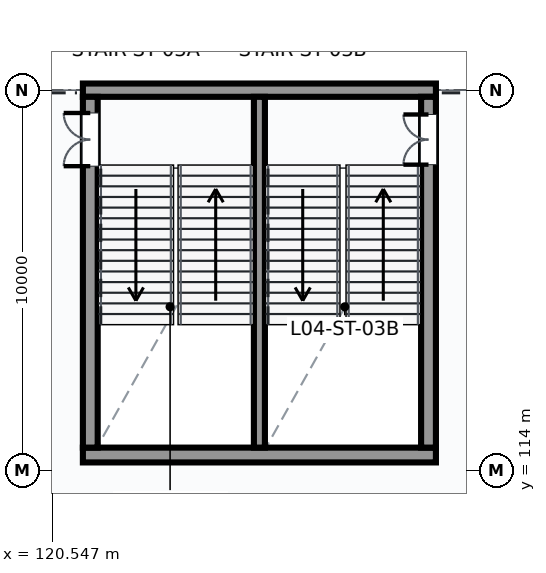
"""IFC4 building model, lengths in metres.
Left out: names, types, materials, properties, quantities, classifications, styles, units other than length and angle.
Written with IfcOpenShell. Run it as: python <this file> out.ifc"""

import sys

from ifc_helpers import new_model, si_unit, direction, frame, frame_2d, origin, place, context, subcontext, project, spatial, rectangle, extrude, element, fill, save


model = new_model("IFC4")
c1 = context("Model", 3, precision=1e-05, world=origin(), true_north=direction((0.0, 1.0)))
c2 = subcontext(c1, "Body", "Model", "MODEL_VIEW")
j1 = project(units=[si_unit("LENGTHUNIT", "METRE"), si_unit("PLANEANGLEUNIT", "RADIAN")], contexts=[c1])
p1 = place(None, origin())
s1 = spatial("IfcSite", under=j1, at=p1, CompositionType="ELEMENT")
p2 = place(p1, origin())
s2 = spatial("IfcBuilding", under=s1, at=p2, CompositionType="ELEMENT")
p3 = place(p2, frame((0.0, 0.0, 19.2)))
s3 = spatial("IfcBuildingStorey", under=s2, at=p3, CompositionType="ELEMENT", Elevation=19.2)
p4 = place(p3, frame((121.355, 114.4, 0.0), z_axis=(0.0, 0.0, 1.0), x_axis=(1.0, 0.0, 0.0)))
e1 = element("IfcWall", 1, at=p4, inside=s3, PredefinedType="SHEAR", context=c2, shape_type="SweptSolid", body=[
    extrude(rectangle(XDim=9.29, YDim=0.39, at=frame_2d((4.645, 0.0))), origin(), (0.0, 0.0, 1.0), 5.4),
])
p5 = place(p3, frame((121.355, 124.0, 0.0), z_axis=(0.0, 0.0, 1.0), x_axis=(1.0, 0.0, 0.0)))
e2 = element("IfcWall", 2, at=p5, inside=s3, PredefinedType="SHEAR", context=c2, shape_type="SweptSolid", body=[
    extrude(rectangle(XDim=9.29, YDim=0.35, at=frame_2d((4.645, 0.0))), origin(), (0.0, 0.0, 1.0), 4.506),
])
p6 = place(p3, frame((121.55, 114.595, 0.0), z_axis=(0.0, 0.0, 1.0), x_axis=(0.0, 1.0, 0.0)))
e3 = element("IfcWall", 3, at=p6, inside=s3, PredefinedType="SHEAR", context=c2, shape_type="SweptSolid", body=[
    extrude(rectangle(XDim=9.23, YDim=0.39, at=frame_2d((4.615, 0.0))), origin(), (0.0, 0.0, 1.0), 5.4),
])
p7 = place(p6, frame((7.405, 0.0, 0.0)))
e4 = element("IfcOpeningElement", 4, at=p7, cuts=e3, PredefinedType="OPENING", context=c2, shape_type="SweptSolid", body=[
    extrude(rectangle(XDim=1.4, YDim=2.2, at=frame_2d((0.7, 1.1))), frame((0.0, 0.205, 0.0), z_axis=(0.0, -1.0, 0.0), x_axis=(1.0, 0.0, 0.0)), (0.0, 0.0, 1.0), 0.41),
])
p8 = place(p3, frame((130.45, 114.595, 0.0), z_axis=(0.0, 0.0, 1.0), x_axis=(0.0, 1.0, 0.0)))
e5 = element("IfcWall", 5, at=p8, inside=s3, PredefinedType="SHEAR", context=c2, shape_type="SweptSolid", body=[
    extrude(rectangle(XDim=9.23, YDim=0.39, at=frame_2d((4.615, 0.0))), origin(), (0.0, 0.0, 1.0), 5.4),
])
p9 = place(p8, frame((7.445, 0.0, 0.0)))
e6 = element("IfcOpeningElement", 6, at=p9, cuts=e5, PredefinedType="OPENING", context=c2, shape_type="SweptSolid", body=[
    extrude(rectangle(XDim=1.32, YDim=2.2, at=frame_2d((0.66, 1.1))), frame((0.0, 0.205, 0.0), z_axis=(0.0, -1.0, 0.0), x_axis=(1.0, 0.0, 0.0)), (0.0, 0.0, 1.0), 0.41),
])
p10 = place(p3, frame((126.0, 114.595, 0.0), z_axis=(0.0, 0.0, 1.0), x_axis=(0.0, 1.0, 0.0)))
e7 = element("IfcWall", 7, at=p10, inside=s3, PredefinedType="SHEAR", context=c2, shape_type="SweptSolid", body=[
    extrude(rectangle(XDim=9.23, YDim=0.29, at=frame_2d((4.615, 0.0))), origin(), (0.0, 0.0, 1.0), 5.4),
])
p11 = place(p7, frame((1.4, 0.0, 0.0), z_axis=(0.0, 0.0, 1.0), x_axis=(-1.0, 0.0, 0.0)))
e8 = element("IfcDoor", 8, at=p11, inside=s3, OperationType="DOUBLE_DOOR_SINGLE_SWING", PredefinedType="DOOR", context=c2, shape_type="SweptSolid", body=[
    extrude(rectangle(XDim=1.4, YDim=2.2, at=frame_2d((0.7, 1.1))), frame((0.0, 0.025, 0.0), z_axis=(0.0, -1.0, 0.0), x_axis=(1.0, 0.0, 0.0)), (0.0, 0.0, 1.0), 0.05),
])
fill(e4, e8)
p12 = place(p9, origin())
e9 = element("IfcDoor", 9, at=p12, inside=s3, OperationType="DOUBLE_DOOR_SINGLE_SWING", PredefinedType="DOOR", context=c2, shape_type="SweptSolid", body=[
    extrude(rectangle(XDim=1.32, YDim=2.2, at=frame_2d((0.66, 1.1))), frame((0.0, 0.025, 0.0), z_axis=(0.0, -1.0, 0.0), x_axis=(1.0, 0.0, 0.0)), (0.0, 0.0, 1.0), 0.05),
])
fill(e6, e9)
save(model, sys.argv[1])
